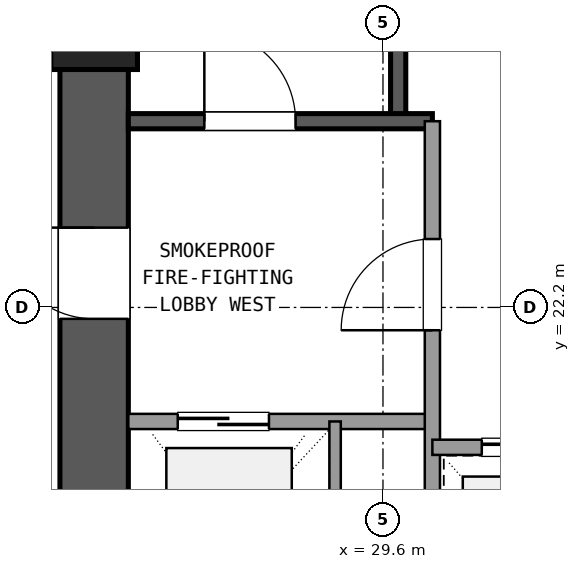
"""IFC4 building model, lengths in metres.
Left out: names, types, materials, properties, quantities, classifications, styles, units other than length and angle.
Written with IfcOpenShell. Run it as: python <this file> out.ifc"""

import sys

from ifc_helpers import new_model, si_unit, direction, frame, frame_2d, origin, origin_2d, place, context, subcontext, project, spatial, rectangle, extrude, element, fill, save


model = new_model("IFC4")
c1 = context("Model", 3, precision=1e-05, world=origin(), true_north=direction((0.0, 1.0)))
c2 = subcontext(c1, "Body", "Model", "MODEL_VIEW")
j1 = project(units=[si_unit("LENGTHUNIT", "METRE"), si_unit("PLANEANGLEUNIT", "RADIAN")], contexts=[c1])
p1 = place(None, origin())
s1 = spatial("IfcSite", under=j1, at=p1, CompositionType="ELEMENT")
p2 = place(p1, origin())
s2 = spatial("IfcBuilding", under=s1, at=p2, CompositionType="ELEMENT")
p3 = place(p2, frame((0.0, 0.0, -4.86)))
s3 = spatial("IfcBuildingStorey", under=s2, at=p3, CompositionType="ELEMENT", Elevation=-4.86)
p4 = place(p3, frame((25.8, 25.9, 0.0), z_axis=(0.0, 0.0, 1.0), x_axis=(1.0, 0.0, 0.0)))
e1 = element("IfcColumn", 1, at=p4, inside=s3, PredefinedType="COLUMN", context=c2, shape_type="SweptSolid", body=[
    extrude(rectangle(XDim=1.14, YDim=1.14, at=origin_2d()), origin(), (0.0, 0.0, 1.0), 4.86),
])
p5 = place(p3, frame((25.8, 25.335, 0.0), z_axis=(0.0, 0.0, 1.0), x_axis=(0.0, -1.0, 0.0)))
e2 = element("IfcWall", 2, at=p5, inside=s3, PredefinedType="SHEAR", context=c2, shape_type="SweptSolid", body=[
    extrude(rectangle(XDim=7.47, YDim=0.9, at=frame_2d((3.735, 0.0))), origin(), (0.0, 0.0, 1.0), 4.56),
])
p6 = place(p5, frame((2.085, 0.0, 0.0)))
e3 = element("IfcOpeningElement", 3, at=p6, cuts=e2, PredefinedType="OPENING", context=c2, shape_type="SweptSolid", body=[
    extrude(rectangle(XDim=1.2, YDim=2.15, at=frame_2d((0.6, 1.075))), frame((0.0, 0.46, 0.0), z_axis=(0.0, -1.0, 0.0), x_axis=(1.0, 0.0, 0.0)), (0.0, 0.0, 1.0), 0.92),
])
p7 = place(p3, frame((29.8, 24.65, 0.0), z_axis=(0.0, 0.0, 1.0), x_axis=(0.0, 1.0, 0.0)))
e4 = element("IfcWall", 4, at=p7, inside=s3, PredefinedType="SHEAR", context=c2, shape_type="SweptSolid", body=[
    extrude(rectangle(XDim=9.4, YDim=0.2, at=frame_2d((4.7, 0.0))), origin(), (0.0, 0.0, 1.0), 4.56),
])
p8 = place(p3, frame((26.25, 24.65, 0.0), z_axis=(0.0, 0.0, 1.0), x_axis=(1.0, 0.0, 0.0)))
e5 = element("IfcWall", 5, at=p8, inside=s3, PredefinedType="SHEAR", context=c2, shape_type="SweptSolid", body=[
    extrude(rectangle(XDim=4.0, YDim=0.2, at=frame_2d((2.0, 0.0))), origin(), (0.0, 0.0, 1.0), 4.56),
])
p9 = place(p8, frame((1.0, 0.0, 0.0)))
e6 = element("IfcOpeningElement", 6, at=p9, cuts=e5, PredefinedType="OPENING", context=c2, shape_type="SweptSolid", body=[
    extrude(rectangle(XDim=1.2, YDim=2.15, at=frame_2d((0.6, 1.075))), frame((0.0, 0.11, 0.0), z_axis=(0.0, -1.0, 0.0), x_axis=(1.0, 0.0, 0.0)), (0.0, 0.0, 1.0), 0.22),
])
p10 = place(p3, frame((26.25, 20.7, 0.0), z_axis=(0.0, 0.0, 1.0), x_axis=(1.0, 0.0, 0.0)))
e7 = element("IfcWall", 7, at=p10, inside=s3, PredefinedType="SOLIDWALL", context=c2, shape_type="SweptSolid", body=[
    extrude(rectangle(XDim=4.0, YDim=0.2, at=frame_2d((2.0, 0.0))), origin(), (0.0, 0.0, 1.0), 3.85),
])
p11 = place(p10, frame((0.65, 0.0, 0.0)))
e8 = element("IfcOpeningElement", 8, at=p11, cuts=e7, PredefinedType="OPENING", context=c2, shape_type="SweptSolid", body=[
    extrude(rectangle(XDim=1.2, YDim=2.15, at=frame_2d((0.6, 1.075))), frame((0.0, 0.11, 0.0), z_axis=(0.0, -1.0, 0.0), x_axis=(1.0, 0.0, 0.0)), (0.0, 0.0, 1.0), 0.22),
])
p12 = place(p3, frame((30.25, 17.75, 0.0), z_axis=(0.0, 0.0, 1.0), x_axis=(0.0, 1.0, 0.0)))
e9 = element("IfcWall", 9, at=p12, inside=s3, PredefinedType="SOLIDWALL", context=c2, shape_type="SweptSolid", body=[
    extrude(rectangle(XDim=6.9, YDim=0.2, at=frame_2d((3.45, 0.0))), origin(), (0.0, 0.0, 1.0), 3.85),
])
p13 = place(p12, frame((4.15, 0.0, 0.0)))
e10 = element("IfcOpeningElement", 10, at=p13, cuts=e9, PredefinedType="OPENING", context=c2, shape_type="SweptSolid", body=[
    extrude(rectangle(XDim=1.2, YDim=2.15, at=frame_2d((0.6, 1.075))), frame((0.0, 0.11, 0.0), z_axis=(0.0, -1.0, 0.0), x_axis=(1.0, 0.0, 0.0)), (0.0, 0.0, 1.0), 0.22),
])
p14 = place(p3, frame((28.97, 17.75, 0.0), z_axis=(0.0, 0.0, 1.0), x_axis=(0.0, 1.0, 0.0)))
e11 = element("IfcWall", 11, at=p14, inside=s3, PredefinedType="PARTITIONING", context=c2, shape_type="SweptSolid", body=[
    extrude(rectangle(XDim=2.95, YDim=0.15, at=frame_2d((1.475, 0.0))), origin(), (0.0, 0.0, 1.0), 3.85),
])
p15 = place(p3, frame((30.25, 20.36, 0.0), z_axis=(0.0, 0.0, 1.0), x_axis=(1.0, 0.0, 0.0)))
e12 = element("IfcWall", 12, at=p15, inside=s3, PredefinedType="SOLIDWALL", context=c2, shape_type="SweptSolid", body=[
    extrude(rectangle(XDim=7.0, YDim=0.2, at=frame_2d((3.5, 0.0))), origin(), (0.0, 0.0, 1.0), 3.85),
])
p16 = place(p15, frame((0.65, 0.0, 0.0)))
e13 = element("IfcOpeningElement", 13, at=p16, cuts=e12, PredefinedType="OPENING", context=c2, shape_type="SweptSolid", body=[
    extrude(rectangle(XDim=1.1, YDim=2.15, at=frame_2d((0.55, 1.075))), frame((0.0, 0.11, 0.0), z_axis=(0.0, -1.0, 0.0), x_axis=(1.0, 0.0, 0.0)), (0.0, 0.0, 1.0), 0.22),
])
p17 = place(p15, frame((2.95, 0.0, 0.0)))
e14 = element("IfcOpeningElement", 14, at=p17, cuts=e12, PredefinedType="OPENING", context=c2, shape_type="SweptSolid", body=[
    extrude(rectangle(XDim=1.1, YDim=2.15, at=frame_2d((0.55, 1.075))), frame((0.0, 0.11, 0.0), z_axis=(0.0, -1.0, 0.0), x_axis=(1.0, 0.0, 0.0)), (0.0, 0.0, 1.0), 0.22),
])
p18 = place(p15, frame((5.25, 0.0, 0.0)))
e15 = element("IfcOpeningElement", 15, at=p18, cuts=e12, PredefinedType="OPENING", context=c2, shape_type="SweptSolid", body=[
    extrude(rectangle(XDim=1.1, YDim=2.15, at=frame_2d((0.55, 1.075))), frame((0.0, 0.11, 0.0), z_axis=(0.0, -1.0, 0.0), x_axis=(1.0, 0.0, 0.0)), (0.0, 0.0, 1.0), 0.22),
])
p19 = place(p9, origin())
e16 = element("IfcDoor", 16, at=p19, inside=s3, OperationType="SINGLE_SWING_LEFT", PredefinedType="DOOR", context=c2, shape_type="SweptSolid", body=[
    extrude(rectangle(XDim=1.2, YDim=2.15, at=frame_2d((0.6, 1.075))), frame((0.0, 0.025, 0.0), z_axis=(0.0, -1.0, 0.0), x_axis=(1.0, 0.0, 0.0)), (0.0, 0.0, 1.0), 0.05),
])
fill(e6, e16)
p20 = place(p11, origin())
e17 = element("IfcDoor", 17, at=p20, inside=s3, OperationType="SLIDING_TO_LEFT", PredefinedType="DOOR", context=c2, shape_type="SweptSolid", body=[
    extrude(rectangle(XDim=1.2, YDim=2.15, at=frame_2d((0.6, 1.075))), frame((0.0, 0.025, 0.0), z_axis=(0.0, -1.0, 0.0), x_axis=(1.0, 0.0, 0.0)), (0.0, 0.0, 1.0), 0.05),
])
fill(e8, e17)
p21 = place(p13, origin())
e18 = element("IfcDoor", 18, at=p21, inside=s3, OperationType="SINGLE_SWING_LEFT", PredefinedType="DOOR", context=c2, shape_type="SweptSolid", body=[
    extrude(rectangle(XDim=1.2, YDim=2.15, at=frame_2d((0.6, 1.075))), frame((0.0, 0.025, 0.0), z_axis=(0.0, -1.0, 0.0), x_axis=(1.0, 0.0, 0.0)), (0.0, 0.0, 1.0), 0.05),
])
fill(e10, e18)
p22 = place(p6, frame((1.2, 0.0, 0.0), z_axis=(0.0, 0.0, 1.0), x_axis=(-1.0, 0.0, 0.0)))
e19 = element("IfcDoor", 19, at=p22, inside=s3, OperationType="SINGLE_SWING_LEFT", PredefinedType="DOOR", context=c2, shape_type="SweptSolid", body=[
    extrude(rectangle(XDim=1.2, YDim=2.15, at=frame_2d((0.6, 1.075))), frame((0.0, 0.025, 0.0), z_axis=(0.0, -1.0, 0.0), x_axis=(1.0, 0.0, 0.0)), (0.0, 0.0, 1.0), 0.05),
])
fill(e3, e19)
p23 = place(p16, origin())
e20 = element("IfcDoor", 20, at=p23, inside=s3, OperationType="SLIDING_TO_LEFT", PredefinedType="DOOR", context=c2, shape_type="SweptSolid", body=[
    extrude(rectangle(XDim=1.1, YDim=2.15, at=frame_2d((0.55, 1.075))), frame((0.0, 0.025, 0.0), z_axis=(0.0, -1.0, 0.0), x_axis=(1.0, 0.0, 0.0)), (0.0, 0.0, 1.0), 0.05),
])
fill(e13, e20)
save(model, sys.argv[1])
